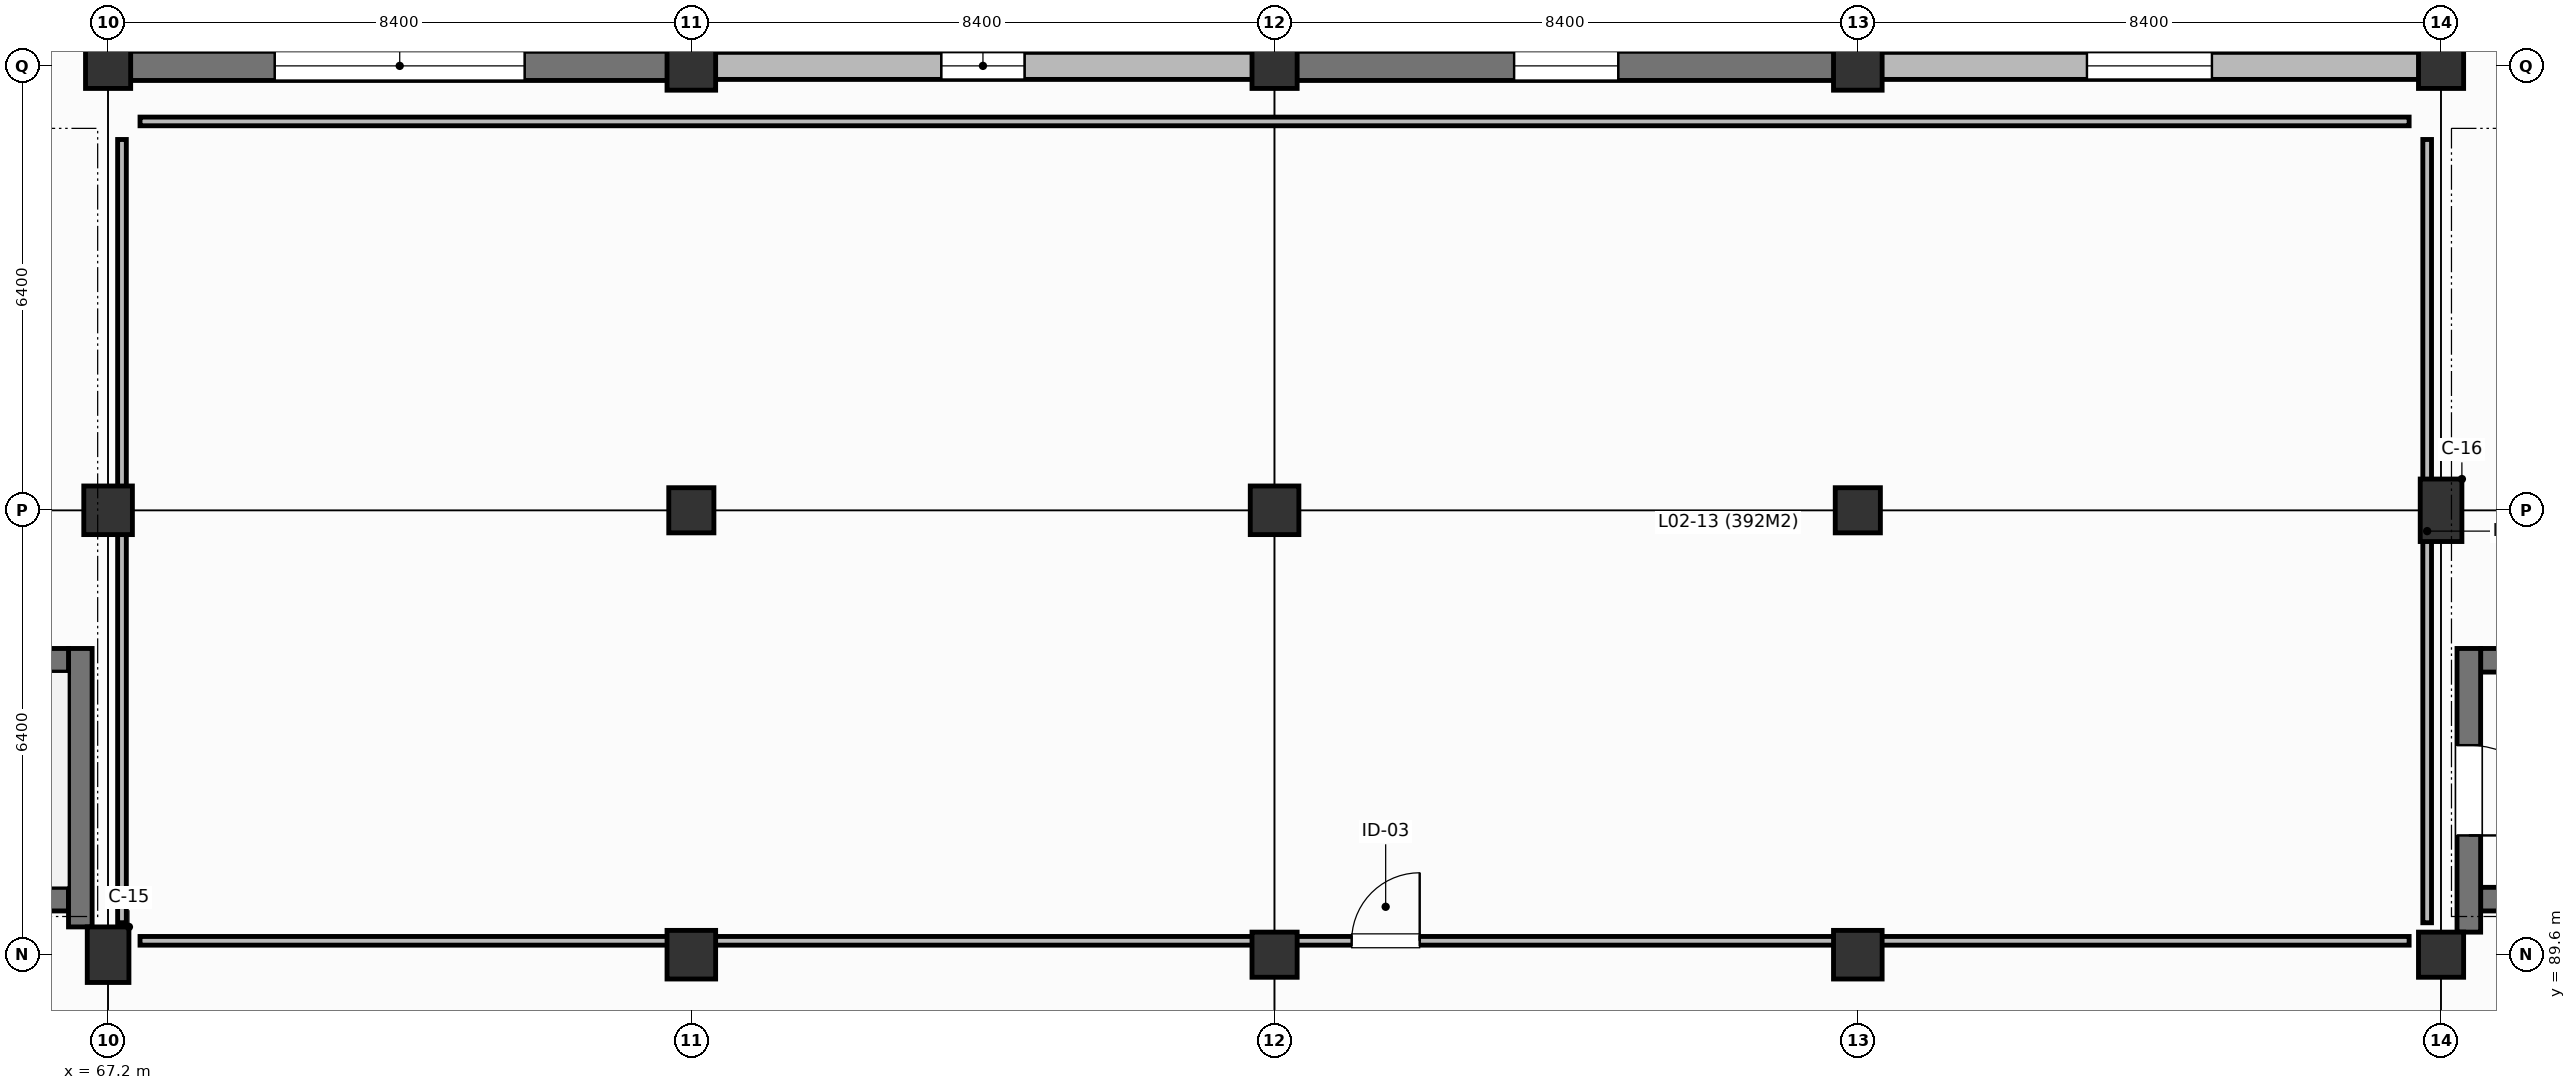
"""IFC4 building model, lengths in metres.
Left out: names, types, materials, properties, quantities, classifications, styles, units other than length and angle.
Written with IfcOpenShell. Run it as: python <this file> out.ifc"""

import sys

from ifc_helpers import new_model, si_unit, direction, frame, frame_2d, origin, origin_2d, place, context, subcontext, project, spatial, rectangle, extrude, element, fill, save


model = new_model("IFC4")
c1 = context("Model", 3, precision=1e-05, world=origin(), true_north=direction((0.0, 1.0)))
c2 = subcontext(c1, "Body", "Model", "MODEL_VIEW")
j1 = project(units=[si_unit("LENGTHUNIT", "METRE"), si_unit("PLANEANGLEUNIT", "RADIAN")], contexts=[c1])
p1 = place(None, origin())
s1 = spatial("IfcSite", under=j1, at=p1, CompositionType="ELEMENT")
p2 = place(p1, origin())
s2 = spatial("IfcBuilding", under=s1, at=p2, CompositionType="ELEMENT")
p3 = place(p2, frame((0.0, 0.0, 9.0)))
s3 = spatial("IfcBuildingStorey", under=s2, at=p3, CompositionType="ELEMENT", Elevation=9.0)
p4 = place(p3, frame((67.2, 89.6, 0.0), z_axis=(0.0, 0.0, 1.0), x_axis=(1.0, 0.0, 0.0)))
e1 = element("IfcColumn", 1, at=p4, inside=s3, PredefinedType="COLUMN", context=c2, shape_type="SweptSolid", body=[
    extrude(rectangle(XDim=0.6, YDim=0.8, at=origin_2d()), origin(), (0.0, 0.0, 1.0), 4.2),
])
p5 = place(p3, frame((67.2, 96.0, 0.0), z_axis=(0.0, 0.0, 1.0), x_axis=(1.0, 0.0, 0.0)))
e2 = element("IfcColumn", 2, at=p5, inside=s3, PredefinedType="COLUMN", context=c2, shape_type="SweptSolid", body=[
    extrude(rectangle(XDim=0.7, YDim=0.7, at=origin_2d()), origin(), (0.0, 0.0, 1.0), 4.2),
])
p6 = place(p3, frame((67.2, 102.4, 0.0), z_axis=(0.0, 0.0, 1.0), x_axis=(1.0, 0.0, 0.0)))
e3 = element("IfcColumn", 3, at=p6, inside=s3, PredefinedType="COLUMN", context=c2, shape_type="SweptSolid", body=[
    extrude(rectangle(XDim=0.65, YDim=0.65, at=origin_2d()), origin(), (0.0, 0.0, 1.0), 4.2),
])
p7 = place(p3, frame((75.6, 89.6, 0.0), z_axis=(0.0, 0.0, 1.0), x_axis=(1.0, 0.0, 0.0)))
e4 = element("IfcColumn", 4, at=p7, inside=s3, PredefinedType="COLUMN", context=c2, shape_type="SweptSolid", body=[
    extrude(rectangle(XDim=0.7, YDim=0.7, at=origin_2d()), origin(), (0.0, 0.0, 1.0), 4.2),
])
p8 = place(p3, frame((75.6, 96.0, 0.0), z_axis=(0.0, 0.0, 1.0), x_axis=(1.0, 0.0, 0.0)))
e5 = element("IfcColumn", 5, at=p8, inside=s3, PredefinedType="COLUMN", context=c2, shape_type="SweptSolid", body=[
    extrude(rectangle(XDim=0.65, YDim=0.65, at=origin_2d()), origin(), (0.0, 0.0, 1.0), 4.2),
])
p9 = place(p3, frame((75.6, 102.4, 0.0), z_axis=(0.0, 0.0, 1.0), x_axis=(1.0, 0.0, 0.0)))
e6 = element("IfcColumn", 6, at=p9, inside=s3, PredefinedType="COLUMN", context=c2, shape_type="SweptSolid", body=[
    extrude(rectangle(XDim=0.7, YDim=0.7, at=origin_2d()), origin(), (0.0, 0.0, 1.0), 4.2),
])
p10 = place(p3, frame((84.0, 89.6, 0.0), z_axis=(0.0, 0.0, 1.0), x_axis=(1.0, 0.0, 0.0)))
e7 = element("IfcColumn", 7, at=p10, inside=s3, PredefinedType="COLUMN", context=c2, shape_type="SweptSolid", body=[
    extrude(rectangle(XDim=0.65, YDim=0.65, at=origin_2d()), origin(), (0.0, 0.0, 1.0), 4.2),
])
p11 = place(p3, frame((84.0, 96.0, 0.0), z_axis=(0.0, 0.0, 1.0), x_axis=(1.0, 0.0, 0.0)))
e8 = element("IfcColumn", 8, at=p11, inside=s3, PredefinedType="COLUMN", context=c2, shape_type="SweptSolid", body=[
    extrude(rectangle(XDim=0.7, YDim=0.7, at=origin_2d()), origin(), (0.0, 0.0, 1.0), 4.2),
])
p12 = place(p3, frame((84.0, 102.4, 0.0), z_axis=(0.0, 0.0, 1.0), x_axis=(1.0, 0.0, 0.0)))
e9 = element("IfcColumn", 9, at=p12, inside=s3, PredefinedType="COLUMN", context=c2, shape_type="SweptSolid", body=[
    extrude(rectangle(XDim=0.65, YDim=0.65, at=origin_2d()), origin(), (0.0, 0.0, 1.0), 4.2),
])
p13 = place(p3, frame((92.4, 89.6, 0.0), z_axis=(0.0, 0.0, 1.0), x_axis=(1.0, 0.0, 0.0)))
e10 = element("IfcColumn", 10, at=p13, inside=s3, PredefinedType="COLUMN", context=c2, shape_type="SweptSolid", body=[
    extrude(rectangle(XDim=0.7, YDim=0.7, at=origin_2d()), origin(), (0.0, 0.0, 1.0), 4.2),
])
p14 = place(p3, frame((92.4, 96.0, 0.0), z_axis=(0.0, 0.0, 1.0), x_axis=(1.0, 0.0, 0.0)))
e11 = element("IfcColumn", 11, at=p14, inside=s3, PredefinedType="COLUMN", context=c2, shape_type="SweptSolid", body=[
    extrude(rectangle(XDim=0.65, YDim=0.65, at=origin_2d()), origin(), (0.0, 0.0, 1.0), 4.2),
])
p15 = place(p3, frame((92.4, 102.4, 0.0), z_axis=(0.0, 0.0, 1.0), x_axis=(1.0, 0.0, 0.0)))
e12 = element("IfcColumn", 12, at=p15, inside=s3, PredefinedType="COLUMN", context=c2, shape_type="SweptSolid", body=[
    extrude(rectangle(XDim=0.7, YDim=0.7, at=origin_2d()), origin(), (0.0, 0.0, 1.0), 4.2),
])
p16 = place(p3, frame((100.8, 89.6, 0.0), z_axis=(0.0, 0.0, 1.0), x_axis=(1.0, 0.0, 0.0)))
e13 = element("IfcColumn", 13, at=p16, inside=s3, PredefinedType="COLUMN", context=c2, shape_type="SweptSolid", body=[
    extrude(rectangle(XDim=0.65, YDim=0.65, at=origin_2d()), origin(), (0.0, 0.0, 1.0), 4.2),
])
p17 = place(p3, frame((100.8, 96.0, 0.0), z_axis=(0.0, 0.0, 1.0), x_axis=(1.0, 0.0, 0.0)))
e14 = element("IfcColumn", 14, at=p17, inside=s3, PredefinedType="COLUMN", context=c2, shape_type="SweptSolid", body=[
    extrude(rectangle(XDim=0.6, YDim=0.9, at=origin_2d()), origin(), (0.0, 0.0, 1.0), 4.2),
])
p18 = place(p3, frame((100.8, 102.4, 0.0), z_axis=(0.0, 0.0, 1.0), x_axis=(1.0, 0.0, 0.0)))
e15 = element("IfcColumn", 15, at=p18, inside=s3, PredefinedType="COLUMN", context=c2, shape_type="SweptSolid", body=[
    extrude(rectangle(XDim=0.65, YDim=0.65, at=origin_2d()), origin(), (0.0, 0.0, 1.0), 4.2),
])
p19 = place(p3, frame((67.2, 108.8, 0.0), z_axis=(0.0, 0.0, 1.0), x_axis=(0.0, -1.0, 0.0)))
e16 = element("IfcWall", 16, at=p19, inside=s3, PredefinedType="STANDARD", context=c2, shape_type="SweptSolid", body=[
    extrude(rectangle(XDim=6.4, YDim=0.39, at=frame_2d((3.2, 0.0))), origin(), (0.0, 0.0, 1.0), 2.94),
])
p20 = place(p19, frame((1.6, 0.0, 0.8)))
e17 = element("IfcOpeningElement", 17, at=p20, cuts=e16, PredefinedType="OPENING", context=c2, shape_type="SweptSolid", body=[
    extrude(rectangle(XDim=3.2, YDim=1.6, at=frame_2d((1.6, 0.8))), frame((0.0, 0.205, 0.0), z_axis=(0.0, -1.0, 0.0), x_axis=(1.0, 0.0, 0.0)), (0.0, 0.0, 1.0), 0.41),
])
p21 = place(p3, frame((67.2, 102.4, 0.0), z_axis=(0.0, 0.0, 1.0), x_axis=(1.0, 0.0, 0.0)))
e18 = element("IfcWall", 18, at=p21, inside=s3, PredefinedType="STANDARD", context=c2, shape_type="SweptSolid", body=[
    extrude(rectangle(XDim=8.4, YDim=0.42, at=frame_2d((4.2, 0.0))), origin(), (0.0, 0.0, 1.0), 3.84),
])
p22 = place(p21, frame((2.4, 0.0, 0.8)))
e19 = element("IfcOpeningElement", 19, at=p22, cuts=e18, PredefinedType="OPENING", context=c2, shape_type="SweptSolid", body=[
    extrude(rectangle(XDim=3.6, YDim=1.6, at=frame_2d((1.8, 0.8))), frame((0.0, 0.22, 0.0), z_axis=(0.0, -1.0, 0.0), x_axis=(1.0, 0.0, 0.0)), (0.0, 0.0, 1.0), 0.44),
])
p23 = place(p3, frame((75.6, 102.4, 0.0), z_axis=(0.0, 0.0, 1.0), x_axis=(1.0, 0.0, 0.0)))
e20 = element("IfcWall", 20, at=p23, inside=s3, PredefinedType="STANDARD", context=c2, shape_type="SweptSolid", body=[
    extrude(rectangle(XDim=8.4, YDim=0.39, at=frame_2d((4.2, 0.0))), origin(), (0.0, 0.0, 1.0), 3.24),
])
p24 = place(p23, frame((3.6, 0.0, 0.8)))
e21 = element("IfcOpeningElement", 21, at=p24, cuts=e20, PredefinedType="OPENING", context=c2, shape_type="SweptSolid", body=[
    extrude(rectangle(XDim=1.2, YDim=1.65, at=frame_2d((0.6, 0.825))), frame((0.0, 0.205, 0.0), z_axis=(0.0, -1.0, 0.0), x_axis=(1.0, 0.0, 0.0)), (0.0, 0.0, 1.0), 0.41),
])
p25 = place(p3, frame((84.0, 102.4, 0.0), z_axis=(0.0, 0.0, 1.0), x_axis=(1.0, 0.0, 0.0)))
e22 = element("IfcWall", 22, at=p25, inside=s3, PredefinedType="STANDARD", context=c2, shape_type="SweptSolid", body=[
    extrude(rectangle(XDim=8.4, YDim=0.42, at=frame_2d((4.2, 0.0))), origin(), (0.0, 0.0, 1.0), 3.84),
])
p26 = place(p25, frame((3.45, 0.0, 0.8)))
e23 = element("IfcOpeningElement", 23, at=p26, cuts=e22, PredefinedType="OPENING", context=c2, shape_type="SweptSolid", body=[
    extrude(rectangle(XDim=1.5, YDim=1.65, at=frame_2d((0.75, 0.825))), frame((0.0, 0.22, 0.0), z_axis=(0.0, -1.0, 0.0), x_axis=(1.0, 0.0, 0.0)), (0.0, 0.0, 1.0), 0.44),
])
p27 = place(p3, frame((92.4, 102.4, 0.0), z_axis=(0.0, 0.0, 1.0), x_axis=(1.0, 0.0, 0.0)))
e24 = element("IfcWall", 24, at=p27, inside=s3, PredefinedType="STANDARD", context=c2, shape_type="SweptSolid", body=[
    extrude(rectangle(XDim=8.4, YDim=0.39, at=frame_2d((4.2, 0.0))), origin(), (0.0, 0.0, 1.0), 3.19),
])
p28 = place(p27, frame((3.3, 0.0, 0.8)))
e25 = element("IfcOpeningElement", 25, at=p28, cuts=e24, PredefinedType="OPENING", context=c2, shape_type="SweptSolid", body=[
    extrude(rectangle(XDim=1.8, YDim=1.65, at=frame_2d((0.9, 0.825))), frame((0.0, 0.205, 0.0), z_axis=(0.0, -1.0, 0.0), x_axis=(1.0, 0.0, 0.0)), (0.0, 0.0, 1.0), 0.41),
])
p29 = place(p3, frame((100.8, 102.4, 0.0), z_axis=(0.0, 0.0, 1.0), x_axis=(0.0, 1.0, 0.0)))
e26 = element("IfcWall", 26, at=p29, inside=s3, PredefinedType="STANDARD", context=c2, shape_type="SweptSolid", body=[
    extrude(rectangle(XDim=6.4, YDim=0.42, at=frame_2d((3.2, 0.0))), origin(), (0.0, 0.0, 1.0), 3.84),
])
p30 = place(p29, frame((2.15, 0.0, 0.8)))
e27 = element("IfcOpeningElement", 27, at=p30, cuts=e26, PredefinedType="OPENING", context=c2, shape_type="SweptSolid", body=[
    extrude(rectangle(XDim=2.1, YDim=1.65, at=frame_2d((1.05, 0.825))), frame((0.0, 0.22, 0.0), z_axis=(0.0, -1.0, 0.0), x_axis=(1.0, 0.0, 0.0)), (0.0, 0.0, 1.0), 0.44),
])
p31 = place(p3, frame((59.37, 90.4, 0.0), z_axis=(0.0, 0.0, 1.0), x_axis=(1.0, 0.0, 0.0)))
e28 = element("IfcWall", 28, at=p31, inside=s3, PredefinedType="SHEAR", context=c2, shape_type="SweptSolid", body=[
    extrude(rectangle(XDim=7.26, YDim=0.34, at=frame_2d((3.63, 0.0))), origin(), (0.0, 0.0, 1.0), 4.2),
])
p32 = place(p3, frame((66.8, 90.0, 0.0), z_axis=(0.0, 0.0, 1.0), x_axis=(0.0, 1.0, 0.0)))
e29 = element("IfcWall", 29, at=p32, inside=s3, PredefinedType="SHEAR", context=c2, shape_type="SweptSolid", body=[
    extrude(rectangle(XDim=4.01, YDim=0.34, at=frame_2d((2.005, 0.0))), origin(), (0.0, 0.0, 1.0), 4.2),
])
for number, where, z_axis, x_axis in (
    (30, (66.63, 93.84, 0.0), (0.0, 0.0, 1.0), (-1.0, 0.0, 0.0)),
    (31, (101.37, 90.4, 0.0), (0.0, 0.0, 1.0), (1.0, 0.0, 0.0)),
    (32, (108.63, 93.84, 0.0), (0.0, 0.0, 1.0), (-1.0, 0.0, 0.0)),
):
    element("IfcWall", number, at=place(p3, frame(where, z_axis=z_axis, x_axis=x_axis)), inside=s3, PredefinedType="SHEAR", context=c2, shape_type="SweptSolid", body=[
        extrude(rectangle(XDim=7.26, YDim=0.34, at=frame_2d((3.63, 0.0))), origin(), (0.0, 0.0, 1.0), 4.2),
    ])
p33 = place(p3, frame((101.2, 94.01, 0.0), z_axis=(0.0, 0.0, 1.0), x_axis=(0.0, -1.0, 0.0)))
e33 = element("IfcWall", 33, at=p33, inside=s3, PredefinedType="SHEAR", context=c2, shape_type="SweptSolid", body=[
    extrude(rectangle(XDim=4.085, YDim=0.34, at=frame_2d((2.042, 0.0))), origin(), (0.0, 0.0, 1.0), 4.2),
])
p34 = place(p33, frame((1.393, 0.0, 0.0)))
e34 = element("IfcOpeningElement", 34, at=p34, cuts=e33, PredefinedType="OPENING", context=c2, shape_type="SweptSolid", body=[
    extrude(rectangle(XDim=1.3, YDim=2.15, at=frame_2d((0.65, 1.075))), frame((0.0, 0.18, 0.0), z_axis=(0.0, -1.0, 0.0), x_axis=(1.0, 0.0, 0.0)), (0.0, 0.0, 1.0), 0.36),
])
p35 = place(p3, frame((67.66, 89.8, 0.0), z_axis=(0.0, 0.0, 1.0), x_axis=(1.0, 0.0, 0.0)))
e35 = element("IfcWall", 35, at=p35, inside=s3, PredefinedType="PARTITIONING", context=c2, shape_type="SweptSolid", body=[
    extrude(rectangle(XDim=32.68, YDim=0.125, at=frame_2d((16.34, 0.0))), origin(), (0.0, 0.0, 1.0), 2.915),
])
p36 = place(p35, frame((17.45, 0.0, 0.0)))
e36 = element("IfcOpeningElement", 36, at=p36, cuts=e35, PredefinedType="OPENING", context=c2, shape_type="SweptSolid", body=[
    extrude(rectangle(XDim=0.98, YDim=2.1, at=frame_2d((0.49, 1.05))), frame((0.0, 0.073, 0.0), z_axis=(0.0, -1.0, 0.0), x_axis=(1.0, 0.0, 0.0)), (0.0, 0.0, 1.0), 0.145),
])
p37 = place(p3, frame((100.6, 90.06, 0.0), z_axis=(0.0, 0.0, 1.0), x_axis=(0.0, 1.0, 0.0)))
e37 = element("IfcWall", 37, at=p37, inside=s3, PredefinedType="PARTITIONING", context=c2, shape_type="SweptSolid", body=[
    extrude(rectangle(XDim=11.28, YDim=0.125, at=frame_2d((5.64, 0.0))), origin(), (0.0, 0.0, 1.0), 2.765),
])
p38 = place(p3, frame((100.34, 101.6, 0.0), z_axis=(0.0, 0.0, 1.0), x_axis=(-1.0, 0.0, 0.0)))
e38 = element("IfcWall", 38, at=p38, inside=s3, PredefinedType="PARTITIONING", context=c2, shape_type="SweptSolid", body=[
    extrude(rectangle(XDim=32.68, YDim=0.125, at=frame_2d((16.34, 0.0))), origin(), (0.0, 0.0, 1.0), 3.84),
])
p39 = place(p3, frame((67.4, 101.34, 0.0), z_axis=(0.0, 0.0, 1.0), x_axis=(0.0, -1.0, 0.0)))
e39 = element("IfcWall", 39, at=p39, inside=s3, PredefinedType="PARTITIONING", context=c2, shape_type="SweptSolid", body=[
    extrude(rectangle(XDim=11.28, YDim=0.125, at=frame_2d((5.64, 0.0))), origin(), (0.0, 0.0, 1.0), 2.965),
])
p40 = place(p22, origin())
e40 = element("IfcWindow", 40, at=p40, inside=s3, PartitioningType="TRIPLE_PANEL_VERTICAL", PredefinedType="WINDOW", context=c2, shape_type="SweptSolid", body=[
    extrude(rectangle(XDim=3.6, YDim=1.6, at=frame_2d((1.8, 0.8))), frame((0.0, 0.03, 0.0), z_axis=(0.0, -1.0, 0.0), x_axis=(1.0, 0.0, 0.0)), (0.0, 0.0, 1.0), 0.06),
])
fill(e19, e40)
p41 = place(p24, origin())
e41 = element("IfcWindow", 41, at=p41, inside=s3, PartitioningType="SINGLE_PANEL", PredefinedType="WINDOW", context=c2, shape_type="SweptSolid", body=[
    extrude(rectangle(XDim=1.2, YDim=1.65, at=frame_2d((0.6, 0.825))), frame((0.0, 0.03, 0.0), z_axis=(0.0, -1.0, 0.0), x_axis=(1.0, 0.0, 0.0)), (0.0, 0.0, 1.0), 0.06),
])
fill(e21, e41)
p42 = place(p26, origin())
e42 = element("IfcWindow", 42, at=p42, inside=s3, PartitioningType="SINGLE_PANEL", PredefinedType="WINDOW", context=c2, shape_type="SweptSolid", body=[
    extrude(rectangle(XDim=1.5, YDim=1.65, at=frame_2d((0.75, 0.825))), frame((0.0, 0.03, 0.0), z_axis=(0.0, -1.0, 0.0), x_axis=(1.0, 0.0, 0.0)), (0.0, 0.0, 1.0), 0.06),
])
fill(e23, e42)
p43 = place(p28, origin())
e43 = element("IfcWindow", 43, at=p43, inside=s3, PartitioningType="SINGLE_PANEL", PredefinedType="WINDOW", context=c2, shape_type="SweptSolid", body=[
    extrude(rectangle(XDim=1.8, YDim=1.65, at=frame_2d((0.9, 0.825))), frame((0.0, 0.03, 0.0), z_axis=(0.0, -1.0, 0.0), x_axis=(1.0, 0.0, 0.0)), (0.0, 0.0, 1.0), 0.06),
])
fill(e25, e43)
p44 = place(p34, origin())
e44 = element("IfcDoor", 44, at=p44, inside=s3, OperationType="SINGLE_SWING_RIGHT", PredefinedType="DOOR", context=c2, shape_type="SweptSolid", body=[
    extrude(rectangle(XDim=1.3, YDim=2.15, at=frame_2d((0.65, 1.075))), frame((0.0, 0.025, 0.0), z_axis=(0.0, -1.0, 0.0), x_axis=(1.0, 0.0, 0.0)), (0.0, 0.0, 1.0), 0.05),
])
fill(e34, e44)
p45 = place(p36, origin())
e45 = element("IfcDoor", 45, at=p45, inside=s3, OperationType="SINGLE_SWING_RIGHT", PredefinedType="DOOR", context=c2, shape_type="SweptSolid", body=[
    extrude(rectangle(XDim=0.98, YDim=2.1, at=frame_2d((0.49, 1.05))), frame((0.0, 0.025, 0.0), z_axis=(0.0, -1.0, 0.0), x_axis=(1.0, 0.0, 0.0)), (0.0, 0.0, 1.0), 0.05),
])
fill(e36, e45)
save(model, sys.argv[1])
